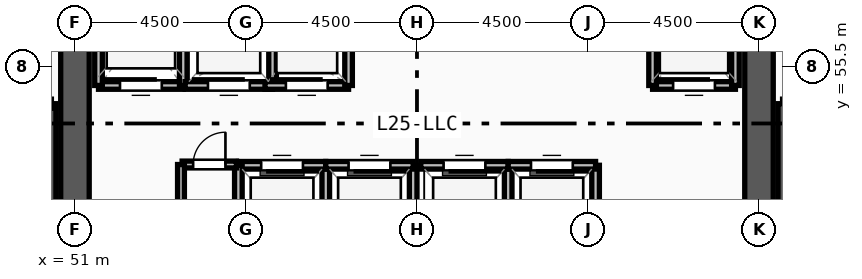
"""IFC4 building model, lengths in metres.
Left out: names, types, materials, properties, quantities, classifications, styles, units other than length and angle.
Written with IfcOpenShell. Run it as: python <this file> out.ifc"""

import sys

from ifc_helpers import new_model, si_unit, direction, frame, frame_2d, origin, place, context, subcontext, project, spatial, rectangle, extrude, source, transform, mapped, element, fill, save


model = new_model("IFC4")
c1 = context("Model", 3, precision=1e-05, world=origin(), true_north=direction((0.0, 1.0)))
c2 = subcontext(c1, "Body", "Model", "MODEL_VIEW")
j1 = project(units=[si_unit("LENGTHUNIT", "METRE"), si_unit("PLANEANGLEUNIT", "RADIAN")], contexts=[c1])
p1 = place(None, origin())
s1 = spatial("IfcSite", under=j1, at=p1, CompositionType="ELEMENT")
p2 = place(p1, origin())
s2 = spatial("IfcBuilding", under=s1, at=p2, CompositionType="ELEMENT")
p3 = place(p2, frame((0.0, 0.0, 97.5)))
s3 = spatial("IfcBuildingStorey", under=s2, at=p3, CompositionType="ELEMENT", Elevation=97.5)
p4 = place(p3, frame((69.0, 60.75, 0.0), z_axis=(0.0, 0.0, 1.0), x_axis=(0.0, -1.0, 0.0)))
e1 = element("IfcWall", 1, at=p4, inside=s3, PredefinedType="SHEAR", context=c2, shape_type="SweptSolid", body=[
    extrude(rectangle(XDim=13.5, YDim=0.75, at=frame_2d((6.75, 0.0))), origin(), (0.0, 0.0, 1.0), 4.32),
])
m1 = source(origin(), c2, "Body", "SweptSolid", [
    extrude(rectangle(XDim=1.2, YDim=2.2, at=frame_2d((0.6, 1.1))), frame((0.0, 0.385, 0.0), z_axis=(0.0, -1.0, 0.0), x_axis=(1.0, 0.0, 0.0)), (0.0, 0.0, 1.0), 0.77),
])
p5 = place(p4, frame((1.2, 0.0, 0.0)))
e2 = element("IfcOpeningElement", 2, at=p5, cuts=e1, PredefinedType="OPENING", context=c2, shape_type="MappedRepresentation", body=[
    mapped(m1, transform((0.0, 0.0, 0.0), x_axis=(1.0, 0.0, 0.0), y_axis=(0.0, 1.0, 0.0), z_axis=(0.0, 0.0, 1.0), scale=1.0)),
])
p6 = place(p3, frame((51.0, 47.25, 0.0), z_axis=(0.0, 0.0, 1.0), x_axis=(0.0, 1.0, 0.0)))
e3 = element("IfcWall", 3, at=p6, inside=s3, PredefinedType="SHEAR", context=c2, shape_type="SweptSolid", body=[
    extrude(rectangle(XDim=13.5, YDim=0.75, at=frame_2d((6.75, 0.0))), origin(), (0.0, 0.0, 1.0), 4.32),
])
m2 = source(origin(), c2, "Body", "SweptSolid", [
    extrude(rectangle(XDim=1.1, YDim=2.2, at=frame_2d((0.55, 1.1))), frame((0.0, 0.385, 0.0), z_axis=(0.0, -1.0, 0.0), x_axis=(1.0, 0.0, 0.0)), (0.0, 0.0, 1.0), 0.77),
])
p7 = place(p6, frame((11.65, 0.0, 0.0)))
e4 = element("IfcOpeningElement", 4, at=p7, cuts=e3, PredefinedType="OPENING", context=c2, shape_type="MappedRepresentation", body=[
    mapped(m2, transform((0.0, 0.0, 0.0), x_axis=(1.0, 0.0, 0.0), y_axis=(0.0, 1.0, 0.0), z_axis=(0.0, 0.0, 1.0), scale=1.0)),
])
for number, where, z_axis, x_axis in (
    (5, (50.38, 46.7, 0.0), (0.0, 0.0, 1.0), (0.0, 1.0, 0.0)),
    (6, (69.62, 54.52, 0.0), (0.0, 0.0, 1.0), (0.0, -1.0, 0.0)),
):
    element("IfcWall", number, at=place(p3, frame(where, z_axis=z_axis, x_axis=x_axis)), inside=s3, PredefinedType="SOLIDWALL", context=c2, shape_type="SweptSolid", body=[
        extrude(rectangle(XDim=7.82, YDim=0.24, at=frame_2d((3.91, 0.0))), origin(), (0.0, 0.0, 1.0), 4.32),
    ])
p8 = place(p3, frame((51.62, 55.0, 0.0), z_axis=(0.0, 0.0, 1.0), x_axis=(1.0, 0.0, 0.0)))
e7 = element("IfcWall", 7, at=p8, inside=s3, PredefinedType="SOLIDWALL", context=c2, shape_type="SweptSolid", body=[
    extrude(rectangle(XDim=2.23, YDim=0.2, at=frame_2d((1.115, 0.0))), origin(), (0.0, 0.0, 1.0), 4.32),
])
m3 = source(origin(), c2, "Body", "SweptSolid", [
    extrude(rectangle(XDim=1.1, YDim=2.2, at=frame_2d((0.55, 1.1))), frame((0.0, 0.11, 0.0), z_axis=(0.0, -1.0, 0.0), x_axis=(1.0, 0.0, 0.0)), (0.0, 0.0, 1.0), 0.22),
])
p9 = place(p8, frame((0.565, 0.0, 0.0)))
e8 = element("IfcOpeningElement", 8, at=p9, cuts=e7, PredefinedType="OPENING", context=c2, shape_type="MappedRepresentation", body=[
    mapped(m3, transform((0.0, 0.0, 0.0), x_axis=(1.0, 0.0, 0.0), y_axis=(0.0, 1.0, 0.0), z_axis=(0.0, 0.0, 1.0), scale=1.0)),
])
for number, where, z_axis, x_axis in (
    (9, (53.85, 55.0, 0.0), (0.0, 0.0, 1.0), (0.0, 1.0, 0.0)),
    (10, (51.62, 58.0, 0.0), (0.0, 0.0, 1.0), (0.0, -1.0, 0.0)),
):
    element("IfcWall", number, at=place(p3, frame(where, z_axis=z_axis, x_axis=x_axis)), inside=s3, PredefinedType="SOLIDWALL", context=c2, shape_type="SweptSolid", body=[
        extrude(rectangle(XDim=3.0, YDim=0.2, at=frame_2d((1.5, 0.0))), origin(), (0.0, 0.0, 1.0), 4.32),
    ])
p10 = place(p3, frame((66.2, 55.0, 0.0), z_axis=(0.0, 0.0, 1.0), x_axis=(1.0, 0.0, 0.0)))
e11 = element("IfcWall", 11, at=p10, inside=s3, PredefinedType="SOLIDWALL", context=c2, shape_type="SweptSolid", body=[
    extrude(rectangle(XDim=2.18, YDim=0.2, at=frame_2d((1.09, 0.0))), origin(), (0.0, 0.0, 1.0), 4.32),
])
p11 = place(p10, frame((0.54, 0.0, 0.0)))
e12 = element("IfcOpeningElement", 12, at=p11, cuts=e11, PredefinedType="OPENING", context=c2, shape_type="MappedRepresentation", body=[
    mapped(m3, transform((0.0, 0.0, 0.0), x_axis=(1.0, 0.0, 0.0), y_axis=(0.0, 1.0, 0.0), z_axis=(0.0, 0.0, 1.0), scale=1.0)),
])
for number, where, z_axis, x_axis in (
    (13, (68.38, 55.0, 0.0), (0.0, 0.0, 1.0), (0.0, 1.0, 0.0)),
    (14, (66.2, 57.75, 0.0), (0.0, 0.0, 1.0), (0.0, -1.0, 0.0)),
):
    element("IfcWall", number, at=place(p3, frame(where, z_axis=z_axis, x_axis=x_axis)), inside=s3, PredefinedType="SOLIDWALL", context=c2, shape_type="SweptSolid", body=[
        extrude(rectangle(XDim=2.75, YDim=0.2, at=frame_2d((1.375, 0.0))), origin(), (0.0, 0.0, 1.0), 4.32),
    ])
p12 = place(p3, frame((57.6, 50.3, 0.0), z_axis=(0.0, 0.0, 1.0), x_axis=(0.0, 1.0, 0.0)))
e15 = element("IfcWall", 15, at=p12, inside=s3, PredefinedType="SOLIDWALL", context=c2, shape_type="SweptSolid", body=[
    extrude(rectangle(XDim=2.6, YDim=0.2, at=frame_2d((1.3, 0.0))), origin(), (0.0, 0.0, 1.0), 4.32),
])
p13 = place(p3, frame((57.6, 52.9, 0.0), z_axis=(0.0, 0.0, 1.0), x_axis=(-1.0, 0.0, 0.0)))
e16 = element("IfcWall", 16, at=p13, inside=s3, PredefinedType="SOLIDWALL", context=c2, shape_type="SweptSolid", body=[
    extrude(rectangle(XDim=2.3, YDim=0.2, at=frame_2d((1.15, 0.0))), origin(), (0.0, 0.0, 1.0), 4.32),
])
p14 = place(p13, frame((0.6, 0.0, 0.0)))
e17 = element("IfcOpeningElement", 17, at=p14, cuts=e16, PredefinedType="OPENING", context=c2, shape_type="MappedRepresentation", body=[
    mapped(m3, transform((0.0, 0.0, 0.0), x_axis=(1.0, 0.0, 0.0), y_axis=(0.0, 1.0, 0.0), z_axis=(0.0, 0.0, 1.0), scale=1.0)),
])
for number, where, z_axis, x_axis in (
    (18, (55.3, 52.9, 0.0), (0.0, 0.0, 1.0), (0.0, -1.0, 0.0)),
    (19, (59.9, 50.3, 0.0), (0.0, 0.0, 1.0), (0.0, 1.0, 0.0)),
):
    element("IfcWall", number, at=place(p3, frame(where, z_axis=z_axis, x_axis=x_axis)), inside=s3, PredefinedType="SOLIDWALL", context=c2, shape_type="SweptSolid", body=[
        extrude(rectangle(XDim=2.6, YDim=0.2, at=frame_2d((1.3, 0.0))), origin(), (0.0, 0.0, 1.0), 4.32),
    ])
p15 = place(p3, frame((59.9, 52.9, 0.0), z_axis=(0.0, 0.0, 1.0), x_axis=(-1.0, 0.0, 0.0)))
e20 = element("IfcWall", 20, at=p15, inside=s3, PredefinedType="SOLIDWALL", context=c2, shape_type="SweptSolid", body=[
    extrude(rectangle(XDim=2.3, YDim=0.2, at=frame_2d((1.15, 0.0))), origin(), (0.0, 0.0, 1.0), 4.32),
])
p16 = place(p15, frame((0.6, 0.0, 0.0)))
e21 = element("IfcOpeningElement", 21, at=p16, cuts=e20, PredefinedType="OPENING", context=c2, shape_type="MappedRepresentation", body=[
    mapped(m3, transform((0.0, 0.0, 0.0), x_axis=(1.0, 0.0, 0.0), y_axis=(0.0, 1.0, 0.0), z_axis=(0.0, 0.0, 1.0), scale=1.0)),
])
p17 = place(p3, frame((62.4, 50.3, 0.0), z_axis=(0.0, 0.0, 1.0), x_axis=(0.0, 1.0, 0.0)))
e22 = element("IfcWall", 22, at=p17, inside=s3, PredefinedType="SOLIDWALL", context=c2, shape_type="SweptSolid", body=[
    extrude(rectangle(XDim=2.6, YDim=0.2, at=frame_2d((1.3, 0.0))), origin(), (0.0, 0.0, 1.0), 4.32),
])
p18 = place(p3, frame((62.4, 52.9, 0.0), z_axis=(0.0, 0.0, 1.0), x_axis=(-1.0, 0.0, 0.0)))
e23 = element("IfcWall", 23, at=p18, inside=s3, PredefinedType="SOLIDWALL", context=c2, shape_type="SweptSolid", body=[
    extrude(rectangle(XDim=2.3, YDim=0.2, at=frame_2d((1.15, 0.0))), origin(), (0.0, 0.0, 1.0), 4.32),
])
p19 = place(p18, frame((0.6, 0.0, 0.0)))
e24 = element("IfcOpeningElement", 24, at=p19, cuts=e23, PredefinedType="OPENING", context=c2, shape_type="MappedRepresentation", body=[
    mapped(m3, transform((0.0, 0.0, 0.0), x_axis=(1.0, 0.0, 0.0), y_axis=(0.0, 1.0, 0.0), z_axis=(0.0, 0.0, 1.0), scale=1.0)),
])
p20 = place(p3, frame((64.7, 50.3, 0.0), z_axis=(0.0, 0.0, 1.0), x_axis=(0.0, 1.0, 0.0)))
e25 = element("IfcWall", 25, at=p20, inside=s3, PredefinedType="SOLIDWALL", context=c2, shape_type="SweptSolid", body=[
    extrude(rectangle(XDim=2.6, YDim=0.2, at=frame_2d((1.3, 0.0))), origin(), (0.0, 0.0, 1.0), 4.32),
])
p21 = place(p3, frame((64.7, 52.9, 0.0), z_axis=(0.0, 0.0, 1.0), x_axis=(-1.0, 0.0, 0.0)))
e26 = element("IfcWall", 26, at=p21, inside=s3, PredefinedType="SOLIDWALL", context=c2, shape_type="SweptSolid", body=[
    extrude(rectangle(XDim=2.3, YDim=0.2, at=frame_2d((1.15, 0.0))), origin(), (0.0, 0.0, 1.0), 4.32),
])
p22 = place(p21, frame((0.6, 0.0, 0.0)))
e27 = element("IfcOpeningElement", 27, at=p22, cuts=e26, PredefinedType="OPENING", context=c2, shape_type="MappedRepresentation", body=[
    mapped(m3, transform((0.0, 0.0, 0.0), x_axis=(1.0, 0.0, 0.0), y_axis=(0.0, 1.0, 0.0), z_axis=(0.0, 0.0, 1.0), scale=1.0)),
])
p23 = place(p3, frame((53.9, 55.0, 0.0), z_axis=(0.0, 0.0, 1.0), x_axis=(1.0, 0.0, 0.0)))
e28 = element("IfcWall", 28, at=p23, inside=s3, PredefinedType="SOLIDWALL", context=c2, shape_type="SweptSolid", body=[
    extrude(rectangle(XDim=2.3, YDim=0.2, at=frame_2d((1.15, 0.0))), origin(), (0.0, 0.0, 1.0), 4.32),
])
p24 = place(p23, frame((0.6, 0.0, 0.0)))
e29 = element("IfcOpeningElement", 29, at=p24, cuts=e28, PredefinedType="OPENING", context=c2, shape_type="MappedRepresentation", body=[
    mapped(m3, transform((0.0, 0.0, 0.0), x_axis=(1.0, 0.0, 0.0), y_axis=(0.0, 1.0, 0.0), z_axis=(0.0, 0.0, 1.0), scale=1.0)),
])
p25 = place(p3, frame((56.2, 55.0, 0.0), z_axis=(0.0, 0.0, 1.0), x_axis=(0.0, 1.0, 0.0)))
e30 = element("IfcWall", 30, at=p25, inside=s3, PredefinedType="SOLIDWALL", context=c2, shape_type="SweptSolid", body=[
    extrude(rectangle(XDim=2.6, YDim=0.2, at=frame_2d((1.3, 0.0))), origin(), (0.0, 0.0, 1.0), 4.32),
])
p26 = place(p3, frame((56.0, 55.0, 0.0), z_axis=(0.0, 0.0, 1.0), x_axis=(1.0, 0.0, 0.0)))
e31 = element("IfcWall", 31, at=p26, inside=s3, PredefinedType="SOLIDWALL", context=c2, shape_type="SweptSolid", body=[
    extrude(rectangle(XDim=2.2, YDim=0.2, at=frame_2d((1.1, 0.0))), origin(), (0.0, 0.0, 1.0), 4.32),
])
p27 = place(p26, frame((0.55, 0.0, 0.0)))
e32 = element("IfcOpeningElement", 32, at=p27, cuts=e31, PredefinedType="OPENING", context=c2, shape_type="MappedRepresentation", body=[
    mapped(m3, transform((0.0, 0.0, 0.0), x_axis=(1.0, 0.0, 0.0), y_axis=(0.0, 1.0, 0.0), z_axis=(0.0, 0.0, 1.0), scale=1.0)),
])
p28 = place(p3, frame((58.2, 55.0, 0.0), z_axis=(0.0, 0.0, 1.0), x_axis=(0.0, 1.0, 0.0)))
e33 = element("IfcWall", 33, at=p28, inside=s3, PredefinedType="SOLIDWALL", context=c2, shape_type="SweptSolid", body=[
    extrude(rectangle(XDim=2.6, YDim=0.2, at=frame_2d((1.3, 0.0))), origin(), (0.0, 0.0, 1.0), 4.32),
])
p29 = place(p3, frame((53.82, 52.92, 0.0), z_axis=(0.0, 0.0, 1.0), x_axis=(1.0, 0.0, 0.0)))
e34 = element("IfcWall", 34, at=p29, inside=s3, PredefinedType="PARTITIONING", context=c2, shape_type="SweptSolid", body=[
    extrude(rectangle(XDim=1.43, YDim=0.18, at=frame_2d((0.715, 0.0))), origin(), (0.0, 0.0, 1.0), 4.32),
])
m4 = source(origin(), c2, "Body", "SweptSolid", [
    extrude(rectangle(XDim=0.85, YDim=2.1, at=frame_2d((0.425, 1.05))), frame((0.0, 0.1, 0.0), z_axis=(0.0, -1.0, 0.0), x_axis=(1.0, 0.0, 0.0)), (0.0, 0.0, 1.0), 0.2),
])
p30 = place(p29, frame((0.29, 0.0, 0.0)))
e35 = element("IfcOpeningElement", 35, at=p30, cuts=e34, PredefinedType="OPENING", context=c2, shape_type="MappedRepresentation", body=[
    mapped(m4, transform((0.0, 0.0, 0.0), x_axis=(1.0, 0.0, 0.0), y_axis=(0.0, 1.0, 0.0), z_axis=(0.0, 0.0, 1.0), scale=1.0)),
])
p31 = place(p3, frame((53.79, 50.35, 0.0), z_axis=(0.0, 0.0, 1.0), x_axis=(0.0, 1.0, 0.0)))
e36 = element("IfcWall", 36, at=p31, inside=s3, PredefinedType="PARTITIONING", context=c2, shape_type="SweptSolid", body=[
    extrude(rectangle(XDim=2.57, YDim=0.18, at=frame_2d((1.285, 0.0))), origin(), (0.0, 0.0, 1.0), 4.32),
])
m5 = source(origin(), c2, "Body", "SweptSolid", [
    extrude(rectangle(XDim=1.1, YDim=2.2, at=frame_2d((0.55, 1.1))), frame((0.0, 0.025, 0.0), z_axis=(0.0, -1.0, 0.0), x_axis=(1.0, 0.0, 0.0)), (0.0, 0.0, 1.0), 0.05),
])
p32 = place(p9, origin())
e37 = element("IfcDoor", 37, at=p32, inside=s3, OperationType="SLIDING_TO_LEFT", PredefinedType="DOOR", context=c2, shape_type="MappedRepresentation", body=[
    mapped(m5, transform((0.0, 0.0, 0.0), x_axis=(1.0, 0.0, 0.0), y_axis=(0.0, 1.0, 0.0), z_axis=(0.0, 0.0, 1.0), scale=1.0)),
])
fill(e8, e37)
p33 = place(p11, origin())
e38 = element("IfcDoor", 38, at=p33, inside=s3, OperationType="SLIDING_TO_LEFT", PredefinedType="DOOR", context=c2, shape_type="MappedRepresentation", body=[
    mapped(m5, transform((0.0, 0.0, 0.0), x_axis=(1.0, 0.0, 0.0), y_axis=(0.0, 1.0, 0.0), z_axis=(0.0, 0.0, 1.0), scale=1.0)),
])
fill(e12, e38)
p34 = place(p14, origin())
e39 = element("IfcDoor", 39, at=p34, inside=s3, OperationType="SLIDING_TO_LEFT", PredefinedType="DOOR", context=c2, shape_type="MappedRepresentation", body=[
    mapped(m5, transform((0.0, 0.0, 0.0), x_axis=(1.0, 0.0, 0.0), y_axis=(0.0, 1.0, 0.0), z_axis=(0.0, 0.0, 1.0), scale=1.0)),
])
fill(e17, e39)
p35 = place(p16, origin())
e40 = element("IfcDoor", 40, at=p35, inside=s3, OperationType="SLIDING_TO_LEFT", PredefinedType="DOOR", context=c2, shape_type="MappedRepresentation", body=[
    mapped(m5, transform((0.0, 0.0, 0.0), x_axis=(1.0, 0.0, 0.0), y_axis=(0.0, 1.0, 0.0), z_axis=(0.0, 0.0, 1.0), scale=1.0)),
])
fill(e21, e40)
p36 = place(p19, origin())
e41 = element("IfcDoor", 41, at=p36, inside=s3, OperationType="SLIDING_TO_LEFT", PredefinedType="DOOR", context=c2, shape_type="MappedRepresentation", body=[
    mapped(m5, transform((0.0, 0.0, 0.0), x_axis=(1.0, 0.0, 0.0), y_axis=(0.0, 1.0, 0.0), z_axis=(0.0, 0.0, 1.0), scale=1.0)),
])
fill(e24, e41)
p37 = place(p22, origin())
e42 = element("IfcDoor", 42, at=p37, inside=s3, OperationType="SLIDING_TO_LEFT", PredefinedType="DOOR", context=c2, shape_type="MappedRepresentation", body=[
    mapped(m5, transform((0.0, 0.0, 0.0), x_axis=(1.0, 0.0, 0.0), y_axis=(0.0, 1.0, 0.0), z_axis=(0.0, 0.0, 1.0), scale=1.0)),
])
fill(e27, e42)
p38 = place(p24, origin())
e43 = element("IfcDoor", 43, at=p38, inside=s3, OperationType="SLIDING_TO_LEFT", PredefinedType="DOOR", context=c2, shape_type="MappedRepresentation", body=[
    mapped(m5, transform((0.0, 0.0, 0.0), x_axis=(1.0, 0.0, 0.0), y_axis=(0.0, 1.0, 0.0), z_axis=(0.0, 0.0, 1.0), scale=1.0)),
])
fill(e29, e43)
p39 = place(p27, origin())
e44 = element("IfcDoor", 44, at=p39, inside=s3, OperationType="SLIDING_TO_LEFT", PredefinedType="DOOR", context=c2, shape_type="MappedRepresentation", body=[
    mapped(m5, transform((0.0, 0.0, 0.0), x_axis=(1.0, 0.0, 0.0), y_axis=(0.0, 1.0, 0.0), z_axis=(0.0, 0.0, 1.0), scale=1.0)),
])
fill(e32, e44)
m6 = source(origin(), c2, "Body", "SweptSolid", [
    extrude(rectangle(XDim=0.85, YDim=2.1, at=frame_2d((0.425, 1.05))), frame((0.0, 0.025, 0.0), z_axis=(0.0, -1.0, 0.0), x_axis=(1.0, 0.0, 0.0)), (0.0, 0.0, 1.0), 0.05),
])
p40 = place(p30, origin())
e45 = element("IfcDoor", 45, at=p40, inside=s3, OperationType="SINGLE_SWING_RIGHT", PredefinedType="DOOR", context=c2, shape_type="MappedRepresentation", body=[
    mapped(m6, transform((0.0, 0.0, 0.0), x_axis=(1.0, 0.0, 0.0), y_axis=(0.0, 1.0, 0.0), z_axis=(0.0, 0.0, 1.0), scale=1.0)),
])
fill(e35, e45)
save(model, sys.argv[1])
